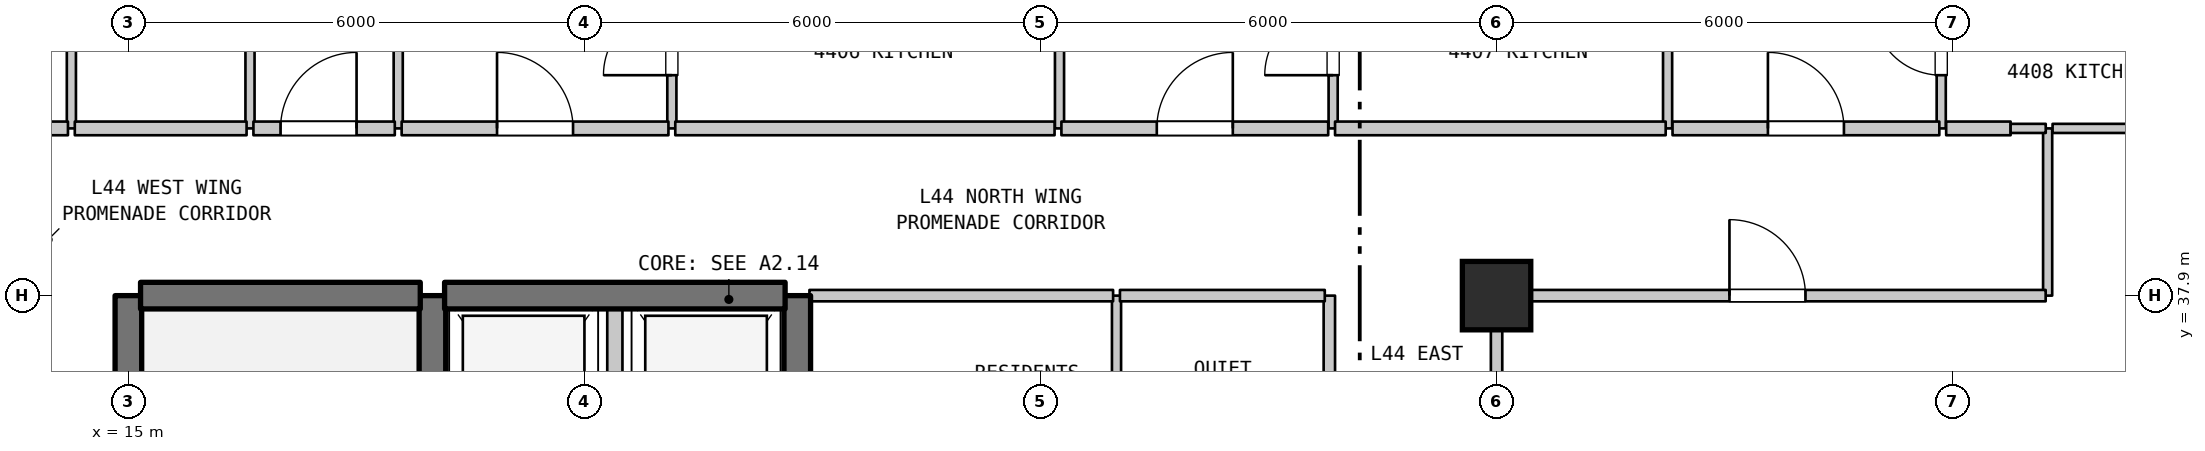
"""IFC4 building model, lengths in metres.
Left out: names, types, materials, properties, quantities, classifications, styles, units other than length and angle.
Written with IfcOpenShell. Run it as: python <this file> out.ifc"""

import sys

from ifc_helpers import new_model, si_unit, direction, frame, frame_2d, origin, origin_2d, place, context, subcontext, project, spatial, rectangle, extrude, element, fill, save


model = new_model("IFC4")
c1 = context("Model", 3, precision=1e-05, world=origin(), true_north=direction((0.0, 1.0)))
c2 = subcontext(c1, "Body", "Model", "MODEL_VIEW")
j1 = project(units=[si_unit("LENGTHUNIT", "METRE"), si_unit("PLANEANGLEUNIT", "RADIAN")], contexts=[c1])
p1 = place(None, origin())
s1 = spatial("IfcSite", under=j1, at=p1, CompositionType="ELEMENT")
p2 = place(p1, origin())
s2 = spatial("IfcBuilding", under=s1, at=p2, CompositionType="ELEMENT")
p3 = place(p2, frame((0.0, 0.0, 180.2)))
s3 = spatial("IfcBuildingStorey", under=s2, at=p3, CompositionType="ELEMENT", Elevation=180.2)
p4 = place(p3, frame((33.0, 37.9, 0.0), z_axis=(0.0, 0.0, 1.0), x_axis=(1.0, 0.0, 0.0)))
e1 = element("IfcColumn", 1, at=p4, inside=s3, PredefinedType="COLUMN", context=c2, shape_type="SweptSolid", body=[
    extrude(rectangle(XDim=0.9, YDim=0.9, at=origin_2d()), origin(), (0.0, 0.0, 1.0), 3.7),
])
p5 = place(p3, frame((14.25, 40.1, 0.0), z_axis=(0.0, 0.0, 1.0), x_axis=(0.0, 1.0, 0.0)))
e2 = element("IfcWall", 2, at=p5, inside=s3, PredefinedType="PARTITIONING", context=c2, shape_type="SweptSolid", body=[
    extrude(rectangle(XDim=3.2, YDim=0.12, at=frame_2d((1.6, 0.0))), origin(), (0.0, 0.0, 1.0), 3.38),
])
p6 = place(p5, frame((1.15, 0.0, 0.0)))
e3 = element("IfcOpeningElement", 3, at=p6, cuts=e2, PredefinedType="OPENING", context=c2, shape_type="SweptSolid", body=[
    extrude(rectangle(XDim=0.9, YDim=2.15, at=frame_2d((0.45, 1.075))), frame((0.0, 0.07, 0.0), z_axis=(0.0, -1.0, 0.0), x_axis=(1.0, 0.0, 0.0)), (0.0, 0.0, 1.0), 0.14),
])
p7 = place(p3, frame((15.0, 31.1, 0.0), z_axis=(0.0, 0.0, 1.0), x_axis=(0.0, 1.0, 0.0)))
e4 = element("IfcWall", 4, at=p7, inside=s3, PredefinedType="SHEAR", context=c2, shape_type="SweptSolid", body=[
    extrude(rectangle(XDim=6.8, YDim=0.35, at=frame_2d((3.4, 0.0))), origin(), (0.0, 0.0, 1.0), 3.38),
])
p8 = place(p3, frame((16.6, 40.1, 0.0), z_axis=(0.0, 0.0, 1.0), x_axis=(0.0, 1.0, 0.0)))
e5 = element("IfcWall", 5, at=p8, inside=s3, PredefinedType="PARTITIONING", context=c2, shape_type="SweptSolid", body=[
    extrude(rectangle(XDim=3.2, YDim=0.12, at=frame_2d((1.6, 0.0))), origin(), (0.0, 0.0, 1.0), 3.38),
])
p9 = place(p3, frame((18.55, 40.1, 0.0), z_axis=(0.0, 0.0, 1.0), x_axis=(0.0, 1.0, 0.0)))
e6 = element("IfcWall", 6, at=p9, inside=s3, PredefinedType="PARTITIONING", context=c2, shape_type="SweptSolid", body=[
    extrude(rectangle(XDim=13.79, YDim=0.12, at=frame_2d((6.895, 0.0))), origin(), (0.0, 0.0, 1.0), 3.38),
])
p10 = place(p3, frame((19.0, 35.0, 0.0), z_axis=(0.0, 0.0, 1.0), x_axis=(0.0, 1.0, 0.0)))
e7 = element("IfcWall", 7, at=p10, inside=s3, PredefinedType="SHEAR", context=c2, shape_type="SweptSolid", body=[
    extrude(rectangle(XDim=2.9, YDim=0.35, at=frame_2d((1.45, 0.0))), origin(), (0.0, 0.0, 1.0), 3.38),
])
p11 = place(p3, frame((21.4, 35.0, 0.0), z_axis=(0.0, 0.0, 1.0), x_axis=(0.0, 1.0, 0.0)))
e8 = element("IfcWall", 8, at=p11, inside=s3, PredefinedType="STANDARD", context=c2, shape_type="SweptSolid", body=[
    extrude(rectangle(XDim=2.9, YDim=0.2, at=frame_2d((1.45, 0.0))), origin(), (0.0, 0.0, 1.0), 3.38),
])
p12 = place(p3, frame((22.15, 40.1, 0.0), z_axis=(0.0, 0.0, 1.0), x_axis=(0.0, 1.0, 0.0)))
e9 = element("IfcWall", 9, at=p12, inside=s3, PredefinedType="PARTITIONING", context=c2, shape_type="SweptSolid", body=[
    extrude(rectangle(XDim=2.3, YDim=0.12, at=frame_2d((1.15, 0.0))), origin(), (0.0, 0.0, 1.0), 3.38),
])
p13 = place(p12, frame((0.7, 0.0, 0.0)))
e10 = element("IfcOpeningElement", 10, at=p13, cuts=e9, PredefinedType="OPENING", context=c2, shape_type="SweptSolid", body=[
    extrude(rectangle(XDim=0.9, YDim=2.15, at=frame_2d((0.45, 1.075))), frame((0.0, 0.07, 0.0), z_axis=(0.0, -1.0, 0.0), x_axis=(1.0, 0.0, 0.0)), (0.0, 0.0, 1.0), 0.14),
])
p14 = place(p3, frame((23.8, 35.0, 0.0), z_axis=(0.0, 0.0, 1.0), x_axis=(0.0, 1.0, 0.0)))
e11 = element("IfcWall", 11, at=p14, inside=s3, PredefinedType="SHEAR", context=c2, shape_type="SweptSolid", body=[
    extrude(rectangle(XDim=2.9, YDim=0.35, at=frame_2d((1.45, 0.0))), origin(), (0.0, 0.0, 1.0), 3.38),
])
p15 = place(p3, frame((27.25, 40.1, 0.0), z_axis=(0.0, 0.0, 1.0), x_axis=(0.0, 1.0, 0.0)))
e12 = element("IfcWall", 12, at=p15, inside=s3, PredefinedType="PARTITIONING", context=c2, shape_type="SweptSolid", body=[
    extrude(rectangle(XDim=2.3, YDim=0.12, at=frame_2d((1.15, 0.0))), origin(), (0.0, 0.0, 1.0), 3.38),
])
p16 = place(p3, frame((28.0, 35.0, 0.0), z_axis=(0.0, 0.0, 1.0), x_axis=(0.0, 1.0, 0.0)))
e13 = element("IfcWall", 13, at=p16, inside=s3, PredefinedType="PARTITIONING", context=c2, shape_type="SweptSolid", body=[
    extrude(rectangle(XDim=2.9, YDim=0.12, at=frame_2d((1.45, 0.0))), origin(), (0.0, 0.0, 1.0), 3.38),
])
p17 = place(p3, frame((30.8, 35.0, 0.0), z_axis=(0.0, 0.0, 1.0), x_axis=(0.0, 1.0, 0.0)))
e14 = element("IfcWall", 14, at=p17, inside=s3, PredefinedType="STANDARD", context=c2, shape_type="SweptSolid", body=[
    extrude(rectangle(XDim=2.9, YDim=0.15, at=frame_2d((1.45, 0.0))), origin(), (0.0, 0.0, 1.0), 3.38),
])
p18 = place(p3, frame((30.85, 40.1, 0.0), z_axis=(0.0, 0.0, 1.0), x_axis=(0.0, 1.0, 0.0)))
e15 = element("IfcWall", 15, at=p18, inside=s3, PredefinedType="PARTITIONING", context=c2, shape_type="SweptSolid", body=[
    extrude(rectangle(XDim=2.3, YDim=0.12, at=frame_2d((1.15, 0.0))), origin(), (0.0, 0.0, 1.0), 3.38),
])
p19 = place(p18, frame((0.7, 0.0, 0.0)))
e16 = element("IfcOpeningElement", 16, at=p19, cuts=e15, PredefinedType="OPENING", context=c2, shape_type="SweptSolid", body=[
    extrude(rectangle(XDim=0.9, YDim=2.15, at=frame_2d((0.45, 1.075))), frame((0.0, 0.07, 0.0), z_axis=(0.0, -1.0, 0.0), x_axis=(1.0, 0.0, 0.0)), (0.0, 0.0, 1.0), 0.14),
])
p20 = place(p3, frame((33.0, 32.8, 0.0), z_axis=(0.0, 0.0, 1.0), x_axis=(0.0, 1.0, 0.0)))
e17 = element("IfcWall", 17, at=p20, inside=s3, PredefinedType="STANDARD", context=c2, shape_type="SweptSolid", body=[
    extrude(rectangle(XDim=5.1, YDim=0.15, at=frame_2d((2.55, 0.0))), origin(), (0.0, 0.0, 1.0), 2.88),
])
p21 = place(p20, frame((1.978, 0.0, 0.0)))
e18 = element("IfcOpeningElement", 18, at=p21, cuts=e17, PredefinedType="OPENING", context=c2, shape_type="SweptSolid", body=[
    extrude(rectangle(XDim=1.0, YDim=2.15, at=frame_2d((0.5, 1.075))), frame((0.0, 0.085, 0.0), z_axis=(0.0, -1.0, 0.0), x_axis=(1.0, 0.0, 0.0)), (0.0, 0.0, 1.0), 0.17),
])
p22 = place(p3, frame((35.25, 40.1, 0.0), z_axis=(0.0, 0.0, 1.0), x_axis=(0.0, 1.0, 0.0)))
e19 = element("IfcWall", 19, at=p22, inside=s3, PredefinedType="PARTITIONING", context=c2, shape_type="SweptSolid", body=[
    extrude(rectangle(XDim=2.3, YDim=0.12, at=frame_2d((1.15, 0.0))), origin(), (0.0, 0.0, 1.0), 3.38),
])
p23 = place(p3, frame((38.85, 40.1, 0.0), z_axis=(0.0, 0.0, 1.0), x_axis=(0.0, 1.0, 0.0)))
e20 = element("IfcWall", 20, at=p23, inside=s3, PredefinedType="PARTITIONING", context=c2, shape_type="SweptSolid", body=[
    extrude(rectangle(XDim=2.3, YDim=0.12, at=frame_2d((1.15, 0.0))), origin(), (0.0, 0.0, 1.0), 3.38),
])
p24 = place(p23, frame((0.7, 0.0, 0.0)))
e21 = element("IfcOpeningElement", 21, at=p24, cuts=e20, PredefinedType="OPENING", context=c2, shape_type="SweptSolid", body=[
    extrude(rectangle(XDim=0.9, YDim=2.15, at=frame_2d((0.45, 1.075))), frame((0.0, 0.07, 0.0), z_axis=(0.0, -1.0, 0.0), x_axis=(1.0, 0.0, 0.0)), (0.0, 0.0, 1.0), 0.14),
])
p25 = place(p3, frame((40.25, 37.9, 0.0), z_axis=(0.0, 0.0, 1.0), x_axis=(0.0, 1.0, 0.0)))
e22 = element("IfcWall", 22, at=p25, inside=s3, PredefinedType="PARTITIONING", context=c2, shape_type="SweptSolid", body=[
    extrude(rectangle(XDim=2.2, YDim=0.12, at=frame_2d((1.1, 0.0))), origin(), (0.0, 0.0, 1.0), 3.38),
])
p26 = place(p3, frame((15.16, 37.9, 0.0), z_axis=(0.0, 0.0, 1.0), x_axis=(1.0, 0.0, 0.0)))
e23 = element("IfcWall", 23, at=p26, inside=s3, PredefinedType="SHEAR", context=c2, shape_type="SweptSolid", body=[
    extrude(rectangle(XDim=3.68, YDim=0.35, at=frame_2d((1.84, 0.0))), origin(), (0.0, 0.0, 1.0), 3.38),
])
p27 = place(p3, frame((19.16, 37.9, 0.0), z_axis=(0.0, 0.0, 1.0), x_axis=(1.0, 0.0, 0.0)))
e24 = element("IfcWall", 24, at=p27, inside=s3, PredefinedType="SHEAR", context=c2, shape_type="SweptSolid", body=[
    extrude(rectangle(XDim=4.48, YDim=0.35, at=frame_2d((2.24, 0.0))), origin(), (0.0, 0.0, 1.0), 3.38),
])
p28 = place(p3, frame((23.96, 37.9, 0.0), z_axis=(0.0, 0.0, 1.0), x_axis=(1.0, 0.0, 0.0)))
e25 = element("IfcWall", 25, at=p28, inside=s3, PredefinedType="STANDARD", context=c2, shape_type="SweptSolid", body=[
    extrude(rectangle(XDim=3.995, YDim=0.15, at=frame_2d((1.998, 0.0))), origin(), (0.0, 0.0, 1.0), 2.88),
])
p29 = place(p3, frame((28.045, 37.9, 0.0), z_axis=(0.0, 0.0, 1.0), x_axis=(1.0, 0.0, 0.0)))
e26 = element("IfcWall", 26, at=p29, inside=s3, PredefinedType="STANDARD", context=c2, shape_type="SweptSolid", body=[
    extrude(rectangle(XDim=2.695, YDim=0.15, at=frame_2d((1.348, 0.0))), origin(), (0.0, 0.0, 1.0), 2.88),
])
p30 = place(p3, frame((33.06, 37.9, 0.0), z_axis=(0.0, 0.0, 1.0), x_axis=(1.0, 0.0, 0.0)))
e27 = element("IfcWall", 27, at=p30, inside=s3, PredefinedType="STANDARD", context=c2, shape_type="SweptSolid", body=[
    extrude(rectangle(XDim=7.164, YDim=0.15, at=frame_2d((3.582, 0.0))), origin(), (0.0, 0.0, 1.0), 3.38),
])
p31 = place(p30, frame((3.004, 0.0, 0.0)))
e28 = element("IfcOpeningElement", 28, at=p31, cuts=e27, PredefinedType="OPENING", context=c2, shape_type="SweptSolid", body=[
    extrude(rectangle(XDim=1.0, YDim=2.15, at=frame_2d((0.5, 1.075))), frame((0.0, 0.085, 0.0), z_axis=(0.0, -1.0, 0.0), x_axis=(1.0, 0.0, 0.0)), (0.0, 0.0, 1.0), 0.17),
])
p32 = place(p3, frame((12.875, 40.1, 0.0), z_axis=(0.0, 0.0, 1.0), x_axis=(1.0, 0.0, 0.0)))
e29 = element("IfcWall", 29, at=p32, inside=s3, PredefinedType="STANDARD", context=c2, shape_type="SweptSolid", body=[
    extrude(rectangle(XDim=1.33, YDim=0.18, at=frame_2d((0.665, 0.0))), origin(), (0.0, 0.0, 1.0), 3.38),
])
p33 = place(p3, frame((14.295, 40.1, 0.0), z_axis=(0.0, 0.0, 1.0), x_axis=(1.0, 0.0, 0.0)))
e30 = element("IfcWall", 30, at=p33, inside=s3, PredefinedType="STANDARD", context=c2, shape_type="SweptSolid", body=[
    extrude(rectangle(XDim=2.26, YDim=0.18, at=frame_2d((1.13, 0.0))), origin(), (0.0, 0.0, 1.0), 3.38),
])
p34 = place(p3, frame((16.645, 40.1, 0.0), z_axis=(0.0, 0.0, 1.0), x_axis=(1.0, 0.0, 0.0)))
e31 = element("IfcWall", 31, at=p34, inside=s3, PredefinedType="STANDARD", context=c2, shape_type="SweptSolid", body=[
    extrude(rectangle(XDim=1.86, YDim=0.18, at=frame_2d((0.93, 0.0))), origin(), (0.0, 0.0, 1.0), 3.38),
])
p35 = place(p34, frame((0.357, 0.0, 0.0)))
e32 = element("IfcOpeningElement", 32, at=p35, cuts=e31, PredefinedType="OPENING", context=c2, shape_type="SweptSolid", body=[
    extrude(rectangle(XDim=1.0, YDim=2.15, at=frame_2d((0.5, 1.075))), frame((0.0, 0.1, 0.0), z_axis=(0.0, -1.0, 0.0), x_axis=(1.0, 0.0, 0.0)), (0.0, 0.0, 1.0), 0.2),
])
p36 = place(p3, frame((18.595, 40.1, 0.0), z_axis=(0.0, 0.0, 1.0), x_axis=(1.0, 0.0, 0.0)))
e33 = element("IfcWall", 33, at=p36, inside=s3, PredefinedType="STANDARD", context=c2, shape_type="SweptSolid", body=[
    extrude(rectangle(XDim=3.51, YDim=0.18, at=frame_2d((1.755, 0.0))), origin(), (0.0, 0.0, 1.0), 3.38),
])
p37 = place(p36, frame((1.255, 0.0, 0.0)))
e34 = element("IfcOpeningElement", 34, at=p37, cuts=e33, PredefinedType="OPENING", context=c2, shape_type="SweptSolid", body=[
    extrude(rectangle(XDim=1.0, YDim=2.15, at=frame_2d((0.5, 1.075))), frame((0.0, 0.1, 0.0), z_axis=(0.0, -1.0, 0.0), x_axis=(1.0, 0.0, 0.0)), (0.0, 0.0, 1.0), 0.2),
])
p38 = place(p3, frame((22.195, 40.1, 0.0), z_axis=(0.0, 0.0, 1.0), x_axis=(1.0, 0.0, 0.0)))
e35 = element("IfcWall", 35, at=p38, inside=s3, PredefinedType="STANDARD", context=c2, shape_type="SweptSolid", body=[
    extrude(rectangle(XDim=4.99, YDim=0.18, at=frame_2d((2.495, 0.0))), origin(), (0.0, 0.0, 1.0), 3.38),
])
p39 = place(p3, frame((27.275, 40.1, 0.0), z_axis=(0.0, 0.0, 1.0), x_axis=(1.0, 0.0, 0.0)))
e36 = element("IfcWall", 36, at=p39, inside=s3, PredefinedType="STANDARD", context=c2, shape_type="SweptSolid", body=[
    extrude(rectangle(XDim=3.51, YDim=0.18, at=frame_2d((1.755, 0.0))), origin(), (0.0, 0.0, 1.0), 3.38),
])
p40 = place(p39, frame((1.255, 0.0, 0.0)))
e37 = element("IfcOpeningElement", 37, at=p40, cuts=e36, PredefinedType="OPENING", context=c2, shape_type="SweptSolid", body=[
    extrude(rectangle(XDim=1.0, YDim=2.15, at=frame_2d((0.5, 1.075))), frame((0.0, 0.1, 0.0), z_axis=(0.0, -1.0, 0.0), x_axis=(1.0, 0.0, 0.0)), (0.0, 0.0, 1.0), 0.2),
])
p41 = place(p3, frame((30.875, 40.1, 0.0), z_axis=(0.0, 0.0, 1.0), x_axis=(1.0, 0.0, 0.0)))
e38 = element("IfcWall", 38, at=p41, inside=s3, PredefinedType="STANDARD", context=c2, shape_type="SweptSolid", body=[
    extrude(rectangle(XDim=4.35, YDim=0.18, at=frame_2d((2.175, 0.0))), origin(), (0.0, 0.0, 1.0), 3.38),
])
p42 = place(p3, frame((35.315, 40.1, 0.0), z_axis=(0.0, 0.0, 1.0), x_axis=(1.0, 0.0, 0.0)))
e39 = element("IfcWall", 39, at=p42, inside=s3, PredefinedType="STANDARD", context=c2, shape_type="SweptSolid", body=[
    extrude(rectangle(XDim=3.51, YDim=0.18, at=frame_2d((1.755, 0.0))), origin(), (0.0, 0.0, 1.0), 3.38),
])
p43 = place(p42, frame((1.255, 0.0, 0.0)))
e40 = element("IfcOpeningElement", 40, at=p43, cuts=e39, PredefinedType="OPENING", context=c2, shape_type="SweptSolid", body=[
    extrude(rectangle(XDim=1.0, YDim=2.15, at=frame_2d((0.5, 1.075))), frame((0.0, 0.1, 0.0), z_axis=(0.0, -1.0, 0.0), x_axis=(1.0, 0.0, 0.0)), (0.0, 0.0, 1.0), 0.2),
])
p44 = place(p3, frame((38.915, 40.1, 0.0), z_axis=(0.0, 0.0, 1.0), x_axis=(1.0, 0.0, 0.0)))
e41 = element("IfcWall", 41, at=p44, inside=s3, PredefinedType="STANDARD", context=c2, shape_type="SweptSolid", body=[
    extrude(rectangle(XDim=0.848, YDim=0.18, at=frame_2d((0.424, 0.0))), origin(), (0.0, 0.0, 1.0), 3.38),
])
p45 = place(p3, frame((39.763, 40.1, 0.0), z_axis=(0.0, 0.0, 1.0), x_axis=(1.0, 0.0, 0.0)))
e42 = element("IfcWall", 42, at=p45, inside=s3, PredefinedType="PARTITIONING", context=c2, shape_type="SweptSolid", body=[
    extrude(rectangle(XDim=0.462, YDim=0.12, at=frame_2d((0.231, 0.0))), origin(), (0.0, 0.0, 1.0), 3.38),
])
p46 = place(p3, frame((40.315, 40.1, 0.0), z_axis=(0.0, 0.0, 1.0), x_axis=(1.0, 0.0, 0.0)))
e43 = element("IfcWall", 43, at=p46, inside=s3, PredefinedType="PARTITIONING", context=c2, shape_type="SweptSolid", body=[
    extrude(rectangle(XDim=1.86, YDim=0.12, at=frame_2d((0.93, 0.0))), origin(), (0.0, 0.0, 1.0), 3.38),
])
p47 = place(p13, origin())
e44 = element("IfcDoor", 44, at=p47, inside=s3, OperationType="SINGLE_SWING_LEFT", PredefinedType="DOOR", context=c2, shape_type="SweptSolid", body=[
    extrude(rectangle(XDim=0.9, YDim=2.15, at=frame_2d((0.45, 1.075))), frame((0.0, 0.025, 0.0), z_axis=(0.0, -1.0, 0.0), x_axis=(1.0, 0.0, 0.0)), (0.0, 0.0, 1.0), 0.05),
])
fill(e10, e44)
p48 = place(p19, origin())
e45 = element("IfcDoor", 45, at=p48, inside=s3, OperationType="SINGLE_SWING_LEFT", PredefinedType="DOOR", context=c2, shape_type="SweptSolid", body=[
    extrude(rectangle(XDim=0.9, YDim=2.15, at=frame_2d((0.45, 1.075))), frame((0.0, 0.025, 0.0), z_axis=(0.0, -1.0, 0.0), x_axis=(1.0, 0.0, 0.0)), (0.0, 0.0, 1.0), 0.05),
])
fill(e16, e45)
p49 = place(p24, origin())
e46 = element("IfcDoor", 46, at=p49, inside=s3, OperationType="SINGLE_SWING_RIGHT", PredefinedType="DOOR", context=c2, shape_type="SweptSolid", body=[
    extrude(rectangle(XDim=0.9, YDim=2.15, at=frame_2d((0.45, 1.075))), frame((0.0, 0.025, 0.0), z_axis=(0.0, -1.0, 0.0), x_axis=(1.0, 0.0, 0.0)), (0.0, 0.0, 1.0), 0.05),
])
fill(e21, e46)
p50 = place(p31, origin())
e47 = element("IfcDoor", 47, at=p50, inside=s3, OperationType="SINGLE_SWING_LEFT", PredefinedType="DOOR", context=c2, shape_type="SweptSolid", body=[
    extrude(rectangle(XDim=1.0, YDim=2.15, at=frame_2d((0.5, 1.075))), frame((0.0, 0.025, 0.0), z_axis=(0.0, -1.0, 0.0), x_axis=(1.0, 0.0, 0.0)), (0.0, 0.0, 1.0), 0.05),
])
fill(e28, e47)
p51 = place(p35, origin())
e48 = element("IfcDoor", 48, at=p51, inside=s3, OperationType="SINGLE_SWING_RIGHT", PredefinedType="DOOR", context=c2, shape_type="SweptSolid", body=[
    extrude(rectangle(XDim=1.0, YDim=2.15, at=frame_2d((0.5, 1.075))), frame((0.0, 0.025, 0.0), z_axis=(0.0, -1.0, 0.0), x_axis=(1.0, 0.0, 0.0)), (0.0, 0.0, 1.0), 0.05),
])
fill(e32, e48)
p52 = place(p37, origin())
e49 = element("IfcDoor", 49, at=p52, inside=s3, OperationType="SINGLE_SWING_LEFT", PredefinedType="DOOR", context=c2, shape_type="SweptSolid", body=[
    extrude(rectangle(XDim=1.0, YDim=2.15, at=frame_2d((0.5, 1.075))), frame((0.0, 0.025, 0.0), z_axis=(0.0, -1.0, 0.0), x_axis=(1.0, 0.0, 0.0)), (0.0, 0.0, 1.0), 0.05),
])
fill(e34, e49)
p53 = place(p40, origin())
e50 = element("IfcDoor", 50, at=p53, inside=s3, OperationType="SINGLE_SWING_RIGHT", PredefinedType="DOOR", context=c2, shape_type="SweptSolid", body=[
    extrude(rectangle(XDim=1.0, YDim=2.15, at=frame_2d((0.5, 1.075))), frame((0.0, 0.025, 0.0), z_axis=(0.0, -1.0, 0.0), x_axis=(1.0, 0.0, 0.0)), (0.0, 0.0, 1.0), 0.05),
])
fill(e37, e50)
p54 = place(p43, origin())
e51 = element("IfcDoor", 51, at=p54, inside=s3, OperationType="SINGLE_SWING_LEFT", PredefinedType="DOOR", context=c2, shape_type="SweptSolid", body=[
    extrude(rectangle(XDim=1.0, YDim=2.15, at=frame_2d((0.5, 1.075))), frame((0.0, 0.025, 0.0), z_axis=(0.0, -1.0, 0.0), x_axis=(1.0, 0.0, 0.0)), (0.0, 0.0, 1.0), 0.05),
])
fill(e40, e51)
save(model, sys.argv[1])
